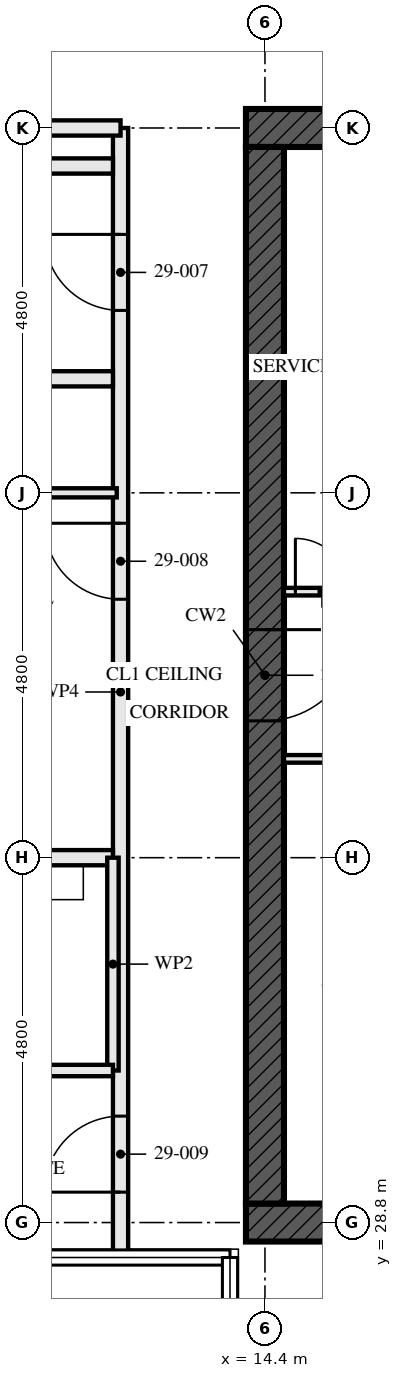
"""IFC4 building model, lengths in metres.
Left out: names, types, materials, properties, quantities, classifications, styles, units other than length and angle.
Written with IfcOpenShell. Run it as: python <this file> out.ifc"""

import sys

from ifc_helpers import new_model, si_unit, direction, frame, frame_2d, origin, place, context, subcontext, project, spatial, rectangle, extrude, element, fill, save


model = new_model("IFC4")
c1 = context("Model", 3, precision=1e-05, world=origin(), true_north=direction((0.0, 1.0)))
c2 = subcontext(c1, "Body", "Model", "MODEL_VIEW")
j1 = project(units=[si_unit("LENGTHUNIT", "METRE"), si_unit("PLANEANGLEUNIT", "RADIAN")], contexts=[c1])
p1 = place(None, origin())
s1 = spatial("IfcSite", under=j1, at=p1, CompositionType="ELEMENT")
p2 = place(p1, origin())
s2 = spatial("IfcBuilding", under=s1, at=p2, CompositionType="ELEMENT")
p3 = place(p2, frame((0.0, 0.0, 108.5)))
s3 = spatial("IfcBuildingStorey", under=s2, at=p3, CompositionType="ELEMENT", Elevation=108.5)
p4 = place(p3, frame((14.15, 28.8, -0.17), z_axis=(0.0, 0.0, 1.0), x_axis=(1.0, 0.0, 0.0)))
e1 = element("IfcWall", 1, at=p4, inside=s3, PredefinedType="SHEAR", context=c2, shape_type="SweptSolid", body=[
    extrude(rectangle(XDim=14.9, YDim=0.5, at=frame_2d((7.45, 0.0))), origin(), (0.0, 0.0, 1.0), 3.5),
])
p5 = place(p4, frame((6.85, 0.0, 0.17)))
e2 = element("IfcOpeningElement", 2, at=p5, cuts=e1, PredefinedType="OPENING", context=c2, shape_type="SweptSolid", body=[
    extrude(rectangle(XDim=1.2, YDim=2.1, at=frame_2d((0.6, 1.05))), frame((0.0, 0.26, 0.0), z_axis=(0.0, -1.0, 0.0), x_axis=(1.0, 0.0, 0.0)), (0.0, 0.0, 1.0), 0.521),
])
p6 = place(p3, frame((29.05, 43.2, -0.17), z_axis=(0.0, 0.0, 1.0), x_axis=(-1.0, 0.0, 0.0)))
e3 = element("IfcWall", 3, at=p6, inside=s3, PredefinedType="SHEAR", context=c2, shape_type="SweptSolid", body=[
    extrude(rectangle(XDim=14.9, YDim=0.5, at=frame_2d((7.45, 0.0))), origin(), (0.0, 0.0, 1.0), 3.5),
])
p7 = place(p6, frame((6.85, 0.0, 0.17)))
e4 = element("IfcOpeningElement", 4, at=p7, cuts=e3, PredefinedType="OPENING", context=c2, shape_type="SweptSolid", body=[
    extrude(rectangle(XDim=1.2, YDim=2.1, at=frame_2d((0.6, 1.05))), frame((0.0, 0.26, 0.0), z_axis=(0.0, -1.0, 0.0), x_axis=(1.0, 0.0, 0.0)), (0.0, 0.0, 1.0), 0.521),
])
p8 = place(p3, frame((14.4, 42.95, -0.17), z_axis=(0.0, 0.0, 1.0), x_axis=(0.0, -1.0, 0.0)))
e5 = element("IfcWall", 5, at=p8, inside=s3, PredefinedType="SHEAR", context=c2, shape_type="SweptSolid", body=[
    extrude(rectangle(XDim=13.9, YDim=0.5, at=frame_2d((6.95, 0.0))), origin(), (0.0, 0.0, 1.0), 3.5),
])
p9 = place(p8, frame((6.35, 0.0, 0.17)))
e6 = element("IfcOpeningElement", 6, at=p9, cuts=e5, PredefinedType="OPENING", context=c2, shape_type="SweptSolid", body=[
    extrude(rectangle(XDim=1.2, YDim=2.1, at=frame_2d((0.6, 1.05))), frame((0.0, 0.26, 0.0), z_axis=(0.0, -1.0, 0.0), x_axis=(1.0, 0.0, 0.0)), (0.0, 0.0, 1.0), 0.521),
])
for number, where, z_axis, x_axis in (
    (7, (7.7, 42.7, 0.0), (0.0, 0.0, 1.0), (1.0, 0.0, 0.0)),
    (8, (7.7, 39.9, 0.0), (0.0, 0.0, 1.0), (1.0, 0.0, 0.0)),
):
    element("IfcWall", number, at=place(p3, frame(where, z_axis=z_axis, x_axis=x_axis)), inside=s3, PredefinedType="SOLIDWALL", context=c2, shape_type="SweptSolid", body=[
        extrude(rectangle(XDim=4.7, YDim=0.2, at=frame_2d((2.35, 0.0))), origin(), (0.0, 0.0, 1.0), 2.99),
    ])
p10 = place(p3, frame((6.4, 38.4, 0.0), z_axis=(0.0, 0.0, 1.0), x_axis=(1.0, 0.0, 0.0)))
e9 = element("IfcWall", 9, at=p10, inside=s3, PredefinedType="PARTITIONING", context=c2, shape_type="SweptSolid", body=[
    extrude(rectangle(XDim=6.05, YDim=0.12, at=frame_2d((3.025, 0.0))), origin(), (0.0, 0.0, 1.0), 2.55),
])
p11 = place(p10, frame((4.05, 0.0, 0.0)))
e10 = element("IfcOpeningElement", 10, at=p11, cuts=e9, PredefinedType="OPENING", context=c2, shape_type="SweptSolid", body=[
    extrude(rectangle(XDim=0.9, YDim=2.1, at=frame_2d((0.45, 1.05))), frame((0.0, 0.071, 0.0), z_axis=(0.0, -1.0, 0.0), x_axis=(1.0, 0.0, 0.0)), (0.0, 0.0, 1.0), 0.141),
])
p12 = place(p3, frame((5.12, 33.6, 0.0), z_axis=(0.0, 0.0, 1.0), x_axis=(1.0, 0.0, 0.0)))
e11 = element("IfcWall", 11, at=p12, inside=s3, PredefinedType="PARTITIONING", context=c2, shape_type="SweptSolid", body=[
    extrude(rectangle(XDim=7.28, YDim=0.2, at=frame_2d((3.64, 0.0))), origin(), (0.0, 0.0, 1.0), 2.55),
])
p13 = place(p3, frame((9.4, 30.8, 0.0), z_axis=(0.0, 0.0, 1.0), x_axis=(1.0, 0.0, 0.0)))
e12 = element("IfcWall", 12, at=p13, inside=s3, PredefinedType="PARTITIONING", context=c2, shape_type="SweptSolid", body=[
    extrude(rectangle(XDim=3.0, YDim=0.15, at=frame_2d((1.5, 0.0))), origin(), (0.0, 0.0, 1.0), 3.33),
])
p14 = place(p3, frame((12.4, 33.6, 0.0), z_axis=(0.0, 0.0, 1.0), x_axis=(0.0, -1.0, 0.0)))
e13 = element("IfcWall", 13, at=p14, inside=s3, PredefinedType="PARTITIONING", context=c2, shape_type="SweptSolid", body=[
    extrude(rectangle(XDim=2.8, YDim=0.15, at=frame_2d((1.4, 0.0))), origin(), (0.0, 0.0, 1.0), 3.33),
])
p15 = place(p3, frame((12.5, 43.2, 0.0), z_axis=(0.0, 0.0, 1.0), x_axis=(0.0, -1.0, 0.0)))
e14 = element("IfcWall", 14, at=p15, inside=s3, PredefinedType="PARTITIONING", context=c2, shape_type="SweptSolid", body=[
    extrude(rectangle(XDim=14.84, YDim=0.2, at=frame_2d((7.42, 0.0))), origin(), (0.0, 0.0, 1.0), 2.32),
])
p16 = place(p15, frame((1.4, 0.0, 0.0)))
e15 = element("IfcOpeningElement", 15, at=p16, cuts=e14, PredefinedType="OPENING", context=c2, shape_type="SweptSolid", body=[
    extrude(rectangle(XDim=1.0, YDim=2.1, at=frame_2d((0.5, 1.05))), frame((0.0, 0.111, 0.0), z_axis=(0.0, -1.0, 0.0), x_axis=(1.0, 0.0, 0.0)), (0.0, 0.0, 1.0), 0.221),
])
p17 = place(p15, frame((5.2, 0.0, 0.0)))
e16 = element("IfcOpeningElement", 16, at=p17, cuts=e14, PredefinedType="OPENING", context=c2, shape_type="SweptSolid", body=[
    extrude(rectangle(XDim=1.0, YDim=2.1, at=frame_2d((0.5, 1.05))), frame((0.0, 0.111, 0.0), z_axis=(0.0, -1.0, 0.0), x_axis=(1.0, 0.0, 0.0)), (0.0, 0.0, 1.0), 0.221),
])
p18 = place(p15, frame((13.0, 0.0, 0.0)))
e17 = element("IfcOpeningElement", 17, at=p18, cuts=e14, PredefinedType="OPENING", context=c2, shape_type="SweptSolid", body=[
    extrude(rectangle(XDim=1.0, YDim=2.1, at=frame_2d((0.5, 1.05))), frame((0.0, 0.111, 0.0), z_axis=(0.0, -1.0, 0.0), x_axis=(1.0, 0.0, 0.0)), (0.0, 0.0, 1.0), 0.221),
])
p19 = place(p3, frame((14.65, 34.9, 0.0), z_axis=(0.0, 0.0, 1.0), x_axis=(1.0, 0.0, 0.0)))
e18 = element("IfcWall", 18, at=p19, inside=s3, PredefinedType="SOLIDWALL", context=c2, shape_type="SweptSolid", body=[
    extrude(rectangle(XDim=5.9, YDim=0.1, at=frame_2d((2.95, 0.0))), origin(), (0.0, 0.0, 1.0), 3.33),
])
p20 = place(p19, frame((1.6, 0.0, 0.0)))
e19 = element("IfcOpeningElement", 19, at=p20, cuts=e18, PredefinedType="OPENING", context=c2, shape_type="SweptSolid", body=[
    extrude(rectangle(XDim=0.7, YDim=2.1, at=frame_2d((0.35, 1.05))), frame((0.0, 0.061, 0.0), z_axis=(0.0, -1.0, 0.0), x_axis=(1.0, 0.0, 0.0)), (0.0, 0.0, 1.0), 0.121),
])
p21 = place(p3, frame((14.65, 37.1, 0.0), z_axis=(0.0, 0.0, 1.0), x_axis=(1.0, 0.0, 0.0)))
e20 = element("IfcWall", 20, at=p21, inside=s3, PredefinedType="SOLIDWALL", context=c2, shape_type="SweptSolid", body=[
    extrude(rectangle(XDim=5.9, YDim=0.1, at=frame_2d((2.95, 0.0))), origin(), (0.0, 0.0, 1.0), 3.33),
])
p22 = place(p21, frame((0.15, 0.0, 0.0)))
e21 = element("IfcOpeningElement", 21, at=p22, cuts=e20, PredefinedType="OPENING", context=c2, shape_type="SweptSolid", body=[
    extrude(rectangle(XDim=0.7, YDim=2.1, at=frame_2d((0.35, 1.05))), frame((0.0, 0.061, 0.0), z_axis=(0.0, -1.0, 0.0), x_axis=(1.0, 0.0, 0.0)), (0.0, 0.0, 1.0), 0.121),
])
p23 = place(p21, frame((1.5, 0.0, 0.0)))
e22 = element("IfcOpeningElement", 22, at=p23, cuts=e20, PredefinedType="OPENING", context=c2, shape_type="SweptSolid", body=[
    extrude(rectangle(XDim=0.9, YDim=2.1, at=frame_2d((0.45, 1.05))), frame((0.0, 0.061, 0.0), z_axis=(0.0, -1.0, 0.0), x_axis=(1.0, 0.0, 0.0)), (0.0, 0.0, 1.0), 0.121),
])
p24 = place(p3, frame((12.5, 43.2, 0.0), z_axis=(0.0, 0.0, 1.0), x_axis=(-1.0, 0.0, 0.0)))
e23 = element("IfcWall", 23, at=p24, inside=s3, PredefinedType="PARTITIONING", context=c2, shape_type="SweptSolid", body=[
    extrude(rectangle(XDim=2.555, YDim=0.2, at=frame_2d((1.277, 0.0))), origin(), (0.0, 0.0, 1.0), 2.32),
])
p25 = place(p16, frame((1.0, 0.0, 0.0), z_axis=(0.0, 0.0, 1.0), x_axis=(-1.0, 0.0, 0.0)))
e24 = element("IfcDoor", 24, at=p25, inside=s3, OperationType="SINGLE_SWING_LEFT", PredefinedType="DOOR", context=c2, shape_type="SweptSolid", body=[
    extrude(rectangle(XDim=1.0, YDim=2.1, at=frame_2d((0.5, 1.05))), frame((0.0, 0.032, 0.0), z_axis=(0.0, -1.0, 0.0), x_axis=(1.0, 0.0, 0.0)), (0.0, 0.0, 1.0), 0.064),
])
fill(e15, e24)
p26 = place(p17, frame((1.0, 0.0, 0.0), z_axis=(0.0, 0.0, 1.0), x_axis=(-1.0, 0.0, 0.0)))
e25 = element("IfcDoor", 25, at=p26, inside=s3, OperationType="SINGLE_SWING_LEFT", PredefinedType="DOOR", context=c2, shape_type="SweptSolid", body=[
    extrude(rectangle(XDim=1.0, YDim=2.1, at=frame_2d((0.5, 1.05))), frame((0.0, 0.027, 0.0), z_axis=(0.0, -1.0, 0.0), x_axis=(1.0, 0.0, 0.0)), (0.0, 0.0, 1.0), 0.054),
])
fill(e16, e25)
p27 = place(p18, frame((1.0, 0.0, 0.0), z_axis=(0.0, 0.0, 1.0), x_axis=(-1.0, 0.0, 0.0)))
e26 = element("IfcDoor", 26, at=p27, inside=s3, OperationType="SINGLE_SWING_RIGHT", PredefinedType="DOOR", context=c2, shape_type="SweptSolid", body=[
    extrude(rectangle(XDim=1.0, YDim=2.1, at=frame_2d((0.5, 1.05))), frame((0.0, 0.027, 0.0), z_axis=(0.0, -1.0, 0.0), x_axis=(1.0, 0.0, 0.0)), (0.0, 0.0, 1.0), 0.054),
])
fill(e17, e26)
p28 = place(p22, origin())
e27 = element("IfcDoor", 27, at=p28, inside=s3, OperationType="SINGLE_SWING_RIGHT", PredefinedType="DOOR", context=c2, shape_type="SweptSolid", body=[
    extrude(rectangle(XDim=0.7, YDim=2.1, at=frame_2d((0.35, 1.05))), frame((0.0, 0.027, 0.0), z_axis=(0.0, -1.0, 0.0), x_axis=(1.0, 0.0, 0.0)), (0.0, 0.0, 1.0), 0.054),
])
fill(e21, e27)
p29 = place(p9, origin())
e28 = element("IfcDoor", 28, at=p29, inside=s3, OperationType="SINGLE_SWING_LEFT", PredefinedType="DOOR", context=c2, shape_type="SweptSolid", body=[
    extrude(rectangle(XDim=1.2, YDim=2.1, at=frame_2d((0.6, 1.05))), frame((0.0, 0.027, 0.0), z_axis=(0.0, -1.0, 0.0), x_axis=(1.0, 0.0, 0.0)), (0.0, 0.0, 1.0), 0.054),
])
fill(e6, e28)
save(model, sys.argv[1])
